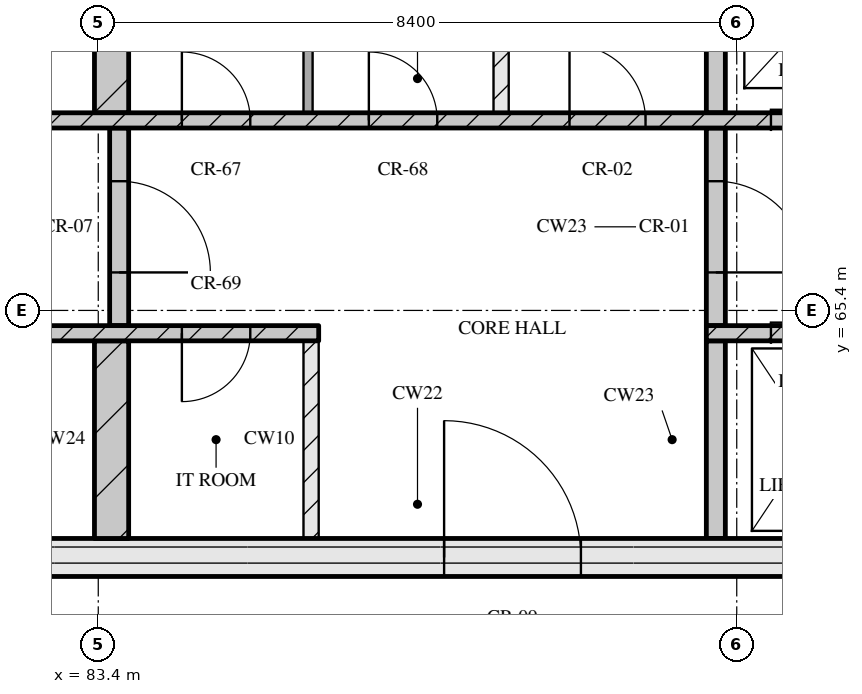
"""IFC4 building model, lengths in metres.
Left out: names, types, materials, properties, quantities, classifications, styles, units other than length and angle.
Written with IfcOpenShell. Run it as: python <this file> out.ifc"""

import sys

from ifc_helpers import new_model, si_unit, direction, frame, frame_2d, origin, place, context, subcontext, project, spatial, rectangle, extrude, element, fill, save


model = new_model("IFC4")
c1 = context("Model", 3, precision=1e-05, world=origin(), true_north=direction((0.0, 1.0)))
c2 = subcontext(c1, "Body", "Model", "MODEL_VIEW")
j1 = project(units=[si_unit("LENGTHUNIT", "METRE"), si_unit("PLANEANGLEUNIT", "RADIAN")], contexts=[c1])
p1 = place(None, origin())
s1 = spatial("IfcSite", under=j1, at=p1, CompositionType="ELEMENT")
p2 = place(p1, origin())
s2 = spatial("IfcBuilding", under=s1, at=p2, CompositionType="ELEMENT")
p3 = place(p2, frame((0.0, 0.0, 267.15)))
s3 = spatial("IfcBuildingStorey", under=s2, at=p3, CompositionType="ELEMENT", Elevation=267.15)
p4 = place(p3, frame((67.3, 62.15, 0.0), z_axis=(0.0, 0.0, 1.0), x_axis=(1.0, 0.0, 0.0)))
e1 = element("IfcWall", 1, at=p4, inside=s3, PredefinedType="SOLIDWALL", context=c2, shape_type="SweptSolid", body=[
    extrude(rectangle(XDim=40.6, YDim=0.5, at=frame_2d((20.3, 0.0))), origin(), (0.0, 0.0, 1.0), 3.32),
])
p5 = place(p4, frame((20.65, 0.0, 0.0)))
e2 = element("IfcOpeningElement", 2, at=p5, cuts=e1, PredefinedType="OPENING", context=c2, shape_type="SweptSolid", body=[
    extrude(rectangle(XDim=1.8, YDim=2.1, at=frame_2d((0.9, 1.05))), frame((0.0, 0.26, 0.0), z_axis=(0.0, -1.0, 0.0), x_axis=(1.0, 0.0, 0.0)), (0.0, 0.0, 1.0), 0.52),
])
p6 = place(p3, frame((83.575, 62.4, 0.0), z_axis=(0.0, 0.0, 1.0), x_axis=(0.0, 1.0, 0.0)))
e3 = element("IfcWall", 3, at=p6, inside=s3, PredefinedType="SOLIDWALL", context=c2, shape_type="SweptSolid", body=[
    extrude(rectangle(XDim=2.6, YDim=0.45, at=frame_2d((1.3, 0.0))), origin(), (0.0, 0.0, 1.0), 3.32),
])
p7 = place(p3, frame((86.2, 62.4, 0.0), z_axis=(0.0, 0.0, 1.0), x_axis=(0.0, 1.0, 0.0)))
e4 = element("IfcWall", 4, at=p7, inside=s3, PredefinedType="PARTITIONING", context=c2, shape_type="SweptSolid", body=[
    extrude(rectangle(XDim=2.6, YDim=0.2, at=frame_2d((1.3, 0.0))), origin(), (0.0, 0.0, 1.0), 3.32),
])
p8 = place(p3, frame((91.525, 62.4, 0.0), z_axis=(0.0, 0.0, 1.0), x_axis=(0.0, 1.0, 0.0)))
e5 = element("IfcWall", 5, at=p8, inside=s3, PredefinedType="SOLIDWALL", context=c2, shape_type="SweptSolid", body=[
    extrude(rectangle(XDim=2.6, YDim=0.25, at=frame_2d((1.3, 0.0))), origin(), (0.0, 0.0, 1.0), 3.32),
])
p9 = place(p3, frame((67.8, 65.1, 0.0), z_axis=(0.0, 0.0, 1.0), x_axis=(1.0, 0.0, 0.0)))
e6 = element("IfcWall", 6, at=p9, inside=s3, PredefinedType="SOLIDWALL", context=c2, shape_type="SweptSolid", body=[
    extrude(rectangle(XDim=18.5, YDim=0.2, at=frame_2d((9.25, 0.0))), origin(), (0.0, 0.0, 1.0), 3.32),
])
p10 = place(p9, frame((7.27, 0.0, 0.0)))
e7 = element("IfcOpeningElement", 7, at=p10, cuts=e6, PredefinedType="OPENING", context=c2, shape_type="SweptSolid", body=[
    extrude(rectangle(XDim=0.9, YDim=2.1, at=frame_2d((0.45, 1.05))), frame((0.0, 0.11, 0.0), z_axis=(0.0, -1.0, 0.0), x_axis=(1.0, 0.0, 0.0)), (0.0, 0.0, 1.0), 0.22),
])
p11 = place(p9, frame((11.45, 0.0, 0.0)))
e8 = element("IfcOpeningElement", 8, at=p11, cuts=e6, PredefinedType="OPENING", context=c2, shape_type="SweptSolid", body=[
    extrude(rectangle(XDim=0.9, YDim=2.1, at=frame_2d((0.45, 1.05))), frame((0.0, 0.11, 0.0), z_axis=(0.0, -1.0, 0.0), x_axis=(1.0, 0.0, 0.0)), (0.0, 0.0, 1.0), 0.22),
])
p12 = place(p9, frame((16.7, 0.0, 0.0)))
e9 = element("IfcOpeningElement", 9, at=p12, cuts=e6, PredefinedType="OPENING", context=c2, shape_type="SweptSolid", body=[
    extrude(rectangle(XDim=0.9, YDim=2.1, at=frame_2d((0.45, 1.05))), frame((0.0, 0.11, 0.0), z_axis=(0.0, -1.0, 0.0), x_axis=(1.0, 0.0, 0.0)), (0.0, 0.0, 1.0), 0.22),
])
p13 = place(p3, frame((91.4, 65.1, 0.0), z_axis=(0.0, 0.0, 1.0), x_axis=(1.0, 0.0, 0.0)))
e10 = element("IfcWall", 10, at=p13, inside=s3, PredefinedType="SOLIDWALL", context=c2, shape_type="SweptSolid", body=[
    extrude(rectangle(XDim=16.0, YDim=0.2, at=frame_2d((8.0, 0.0))), origin(), (0.0, 0.0, 1.0), 3.32),
])
p14 = place(p13, frame((0.85, 0.0, 0.0)))
e11 = element("IfcOpeningElement", 11, at=p14, cuts=e10, PredefinedType="OPENING", context=c2, shape_type="SweptSolid", body=[
    extrude(rectangle(XDim=1.1, YDim=2.1, at=frame_2d((0.55, 1.05))), frame((0.0, 0.11, 0.0), z_axis=(0.0, -1.0, 0.0), x_axis=(1.0, 0.0, 0.0)), (0.0, 0.0, 1.0), 0.22),
])
p15 = place(p13, frame((3.35, 0.0, 0.0)))
e12 = element("IfcOpeningElement", 12, at=p15, cuts=e10, PredefinedType="OPENING", context=c2, shape_type="SweptSolid", body=[
    extrude(rectangle(XDim=1.1, YDim=2.1, at=frame_2d((0.55, 1.05))), frame((0.0, 0.11, 0.0), z_axis=(0.0, -1.0, 0.0), x_axis=(1.0, 0.0, 0.0)), (0.0, 0.0, 1.0), 0.22),
])
p16 = place(p13, frame((5.85, 0.0, 0.0)))
e13 = element("IfcOpeningElement", 13, at=p16, cuts=e10, PredefinedType="OPENING", context=c2, shape_type="SweptSolid", body=[
    extrude(rectangle(XDim=1.1, YDim=2.1, at=frame_2d((0.55, 1.05))), frame((0.0, 0.11, 0.0), z_axis=(0.0, -1.0, 0.0), x_axis=(1.0, 0.0, 0.0)), (0.0, 0.0, 1.0), 0.22),
])
p17 = place(p13, frame((7.83, 0.0, 0.0)))
e14 = element("IfcOpeningElement", 14, at=p17, cuts=e10, PredefinedType="OPENING", context=c2, shape_type="SweptSolid", body=[
    extrude(rectangle(XDim=0.9, YDim=2.1, at=frame_2d((0.45, 1.05))), frame((0.0, 0.11, 0.0), z_axis=(0.0, -1.0, 0.0), x_axis=(1.0, 0.0, 0.0)), (0.0, 0.0, 1.0), 0.22),
])
p18 = place(p3, frame((83.675, 65.2, 0.0), z_axis=(0.0, 0.0, 1.0), x_axis=(0.0, 1.0, 0.0)))
e15 = element("IfcWall", 15, at=p18, inside=s3, PredefinedType="SOLIDWALL", context=c2, shape_type="SweptSolid", body=[
    extrude(rectangle(XDim=2.6, YDim=0.25, at=frame_2d((1.3, 0.0))), origin(), (0.0, 0.0, 1.0), 3.32),
])
p19 = place(p18, frame((0.7, 0.0, 0.0)))
e16 = element("IfcOpeningElement", 16, at=p19, cuts=e15, PredefinedType="OPENING", context=c2, shape_type="SweptSolid", body=[
    extrude(rectangle(XDim=1.2, YDim=2.1, at=frame_2d((0.6, 1.05))), frame((0.0, 0.135, 0.0), z_axis=(0.0, -1.0, 0.0), x_axis=(1.0, 0.0, 0.0)), (0.0, 0.0, 1.0), 0.27),
])
p20 = place(p3, frame((91.525, 65.2, 0.0), z_axis=(0.0, 0.0, 1.0), x_axis=(0.0, 1.0, 0.0)))
e17 = element("IfcWall", 17, at=p20, inside=s3, PredefinedType="SOLIDWALL", context=c2, shape_type="SweptSolid", body=[
    extrude(rectangle(XDim=2.6, YDim=0.25, at=frame_2d((1.3, 0.0))), origin(), (0.0, 0.0, 1.0), 3.32),
])
p21 = place(p20, frame((0.7, 0.0, 0.0)))
e18 = element("IfcOpeningElement", 18, at=p21, cuts=e17, PredefinedType="OPENING", context=c2, shape_type="SweptSolid", body=[
    extrude(rectangle(XDim=1.2, YDim=2.1, at=frame_2d((0.6, 1.05))), frame((0.0, 0.135, 0.0), z_axis=(0.0, -1.0, 0.0), x_axis=(1.0, 0.0, 0.0)), (0.0, 0.0, 1.0), 0.27),
])
p22 = place(p3, frame((76.05, 67.9, 0.0), z_axis=(0.0, 0.0, 1.0), x_axis=(1.0, 0.0, 0.0)))
e19 = element("IfcWall", 19, at=p22, inside=s3, PredefinedType="SOLIDWALL", context=c2, shape_type="SweptSolid", body=[
    extrude(rectangle(XDim=23.1, YDim=0.2, at=frame_2d((11.55, 0.0))), origin(), (0.0, 0.0, 1.0), 3.32),
])
p23 = place(p22, frame((1.4, 0.0, 0.0)))
e20 = element("IfcOpeningElement", 20, at=p23, cuts=e19, PredefinedType="OPENING", context=c2, shape_type="SweptSolid", body=[
    extrude(rectangle(XDim=0.9, YDim=2.1, at=frame_2d((0.45, 1.05))), frame((0.0, 0.11, 0.0), z_axis=(0.0, -1.0, 0.0), x_axis=(1.0, 0.0, 0.0)), (0.0, 0.0, 1.0), 0.22),
])
p24 = place(p22, frame((5.11, 0.0, 0.0)))
e21 = element("IfcOpeningElement", 21, at=p24, cuts=e19, PredefinedType="OPENING", context=c2, shape_type="SweptSolid", body=[
    extrude(rectangle(XDim=0.9, YDim=2.1, at=frame_2d((0.45, 1.05))), frame((0.0, 0.11, 0.0), z_axis=(0.0, -1.0, 0.0), x_axis=(1.0, 0.0, 0.0)), (0.0, 0.0, 1.0), 0.22),
])
p25 = place(p22, frame((8.45, 0.0, 0.0)))
e22 = element("IfcOpeningElement", 22, at=p25, cuts=e19, PredefinedType="OPENING", context=c2, shape_type="SweptSolid", body=[
    extrude(rectangle(XDim=0.9, YDim=2.1, at=frame_2d((0.45, 1.05))), frame((0.0, 0.11, 0.0), z_axis=(0.0, -1.0, 0.0), x_axis=(1.0, 0.0, 0.0)), (0.0, 0.0, 1.0), 0.22),
])
p26 = place(p22, frame((10.91, 0.0, 0.0)))
e23 = element("IfcOpeningElement", 23, at=p26, cuts=e19, PredefinedType="OPENING", context=c2, shape_type="SweptSolid", body=[
    extrude(rectangle(XDim=0.9, YDim=2.1, at=frame_2d((0.45, 1.05))), frame((0.0, 0.11, 0.0), z_axis=(0.0, -1.0, 0.0), x_axis=(1.0, 0.0, 0.0)), (0.0, 0.0, 1.0), 0.22),
])
p27 = place(p22, frame((13.55, 0.0, 0.0)))
e24 = element("IfcOpeningElement", 24, at=p27, cuts=e19, PredefinedType="OPENING", context=c2, shape_type="SweptSolid", body=[
    extrude(rectangle(XDim=1.0, YDim=2.1, at=frame_2d((0.5, 1.05))), frame((0.0, 0.11, 0.0), z_axis=(0.0, -1.0, 0.0), x_axis=(1.0, 0.0, 0.0)), (0.0, 0.0, 1.0), 0.22),
])
p28 = place(p22, frame((16.2, 0.0, 0.0)))
e25 = element("IfcOpeningElement", 25, at=p28, cuts=e19, PredefinedType="OPENING", context=c2, shape_type="SweptSolid", body=[
    extrude(rectangle(XDim=1.1, YDim=2.1, at=frame_2d((0.55, 1.05))), frame((0.0, 0.11, 0.0), z_axis=(0.0, -1.0, 0.0), x_axis=(1.0, 0.0, 0.0)), (0.0, 0.0, 1.0), 0.22),
])
p29 = place(p22, frame((18.7, 0.0, 0.0)))
e26 = element("IfcOpeningElement", 26, at=p29, cuts=e19, PredefinedType="OPENING", context=c2, shape_type="SweptSolid", body=[
    extrude(rectangle(XDim=1.1, YDim=2.1, at=frame_2d((0.55, 1.05))), frame((0.0, 0.11, 0.0), z_axis=(0.0, -1.0, 0.0), x_axis=(1.0, 0.0, 0.0)), (0.0, 0.0, 1.0), 0.22),
])
p30 = place(p22, frame((21.2, 0.0, 0.0)))
e27 = element("IfcOpeningElement", 27, at=p30, cuts=e19, PredefinedType="OPENING", context=c2, shape_type="SweptSolid", body=[
    extrude(rectangle(XDim=1.1, YDim=2.1, at=frame_2d((0.55, 1.05))), frame((0.0, 0.11, 0.0), z_axis=(0.0, -1.0, 0.0), x_axis=(1.0, 0.0, 0.0)), (0.0, 0.0, 1.0), 0.22),
])
p31 = place(p3, frame((83.575, 68.0, 0.0), z_axis=(0.0, 0.0, 1.0), x_axis=(0.0, 1.0, 0.0)))
e28 = element("IfcWall", 28, at=p31, inside=s3, PredefinedType="SOLIDWALL", context=c2, shape_type="SweptSolid", body=[
    extrude(rectangle(XDim=2.6, YDim=0.45, at=frame_2d((1.3, 0.0))), origin(), (0.0, 0.0, 1.0), 3.32),
])
p32 = place(p3, frame((86.16, 68.0, 0.0), z_axis=(0.0, 0.0, 1.0), x_axis=(0.0, 1.0, 0.0)))
e29 = element("IfcWall", 29, at=p32, inside=s3, PredefinedType="PARTITIONING", context=c2, shape_type="SweptSolid", body=[
    extrude(rectangle(XDim=2.6, YDim=0.12, at=frame_2d((1.3, 0.0))), origin(), (0.0, 0.0, 1.0), 3.32),
])
p33 = place(p3, frame((88.7, 68.0, 0.0), z_axis=(0.0, 0.0, 1.0), x_axis=(0.0, 1.0, 0.0)))
e30 = element("IfcWall", 30, at=p33, inside=s3, PredefinedType="PARTITIONING", context=c2, shape_type="SweptSolid", body=[
    extrude(rectangle(XDim=2.6, YDim=0.2, at=frame_2d((1.3, 0.0))), origin(), (0.0, 0.0, 1.0), 3.32),
])
p34 = place(p3, frame((91.525, 68.0, 0.0), z_axis=(0.0, 0.0, 1.0), x_axis=(0.0, 1.0, 0.0)))
e31 = element("IfcWall", 31, at=p34, inside=s3, PredefinedType="SOLIDWALL", context=c2, shape_type="SweptSolid", body=[
    extrude(rectangle(XDim=2.6, YDim=0.25, at=frame_2d((1.3, 0.0))), origin(), (0.0, 0.0, 1.0), 3.32),
])
p35 = place(p5, origin())
e32 = element("IfcDoor", 32, at=p35, inside=s3, OperationType="DOUBLE_DOOR_SINGLE_SWING", PredefinedType="DOOR", context=c2, shape_type="SweptSolid", body=[
    extrude(rectangle(XDim=1.8, YDim=2.1, at=frame_2d((0.9, 1.05))), frame((0.0, 0.025, 0.0), z_axis=(0.0, -1.0, 0.0), x_axis=(1.0, 0.0, 0.0)), (0.0, 0.0, 1.0), 0.05),
])
fill(e2, e32)
p36 = place(p12, origin())
e33 = element("IfcDoor", 33, at=p36, inside=s3, OperationType="SINGLE_SWING_RIGHT", PredefinedType="DOOR", context=c2, shape_type="SweptSolid", body=[
    extrude(rectangle(XDim=0.9, YDim=2.1, at=frame_2d((0.45, 1.05))), frame((0.0, 0.025, 0.0), z_axis=(0.0, -1.0, 0.0), x_axis=(1.0, 0.0, 0.0)), (0.0, 0.0, 1.0), 0.05),
])
fill(e9, e33)
p37 = place(p14, origin())
e34 = element("IfcDoor", 34, at=p37, inside=s3, OperationType="SLIDING_TO_LEFT", PredefinedType="DOOR", context=c2, shape_type="SweptSolid", body=[
    extrude(rectangle(XDim=1.1, YDim=2.1, at=frame_2d((0.55, 1.05))), frame((0.0, 0.025, 0.0), z_axis=(0.0, -1.0, 0.0), x_axis=(1.0, 0.0, 0.0)), (0.0, 0.0, 1.0), 0.05),
])
fill(e11, e34)
p38 = place(p19, origin())
e35 = element("IfcDoor", 35, at=p38, inside=s3, OperationType="SINGLE_SWING_RIGHT", PredefinedType="DOOR", context=c2, shape_type="SweptSolid", body=[
    extrude(rectangle(XDim=1.2, YDim=2.1, at=frame_2d((0.6, 1.05))), frame((0.0, 0.025, 0.0), z_axis=(0.0, -1.0, 0.0), x_axis=(1.0, 0.0, 0.0)), (0.0, 0.0, 1.0), 0.05),
])
fill(e16, e35)
p39 = place(p21, origin())
e36 = element("IfcDoor", 36, at=p39, inside=s3, OperationType="SINGLE_SWING_RIGHT", PredefinedType="DOOR", context=c2, shape_type="SweptSolid", body=[
    extrude(rectangle(XDim=1.2, YDim=2.1, at=frame_2d((0.6, 1.05))), frame((0.0, 0.025, 0.0), z_axis=(0.0, -1.0, 0.0), x_axis=(1.0, 0.0, 0.0)), (0.0, 0.0, 1.0), 0.05),
])
fill(e18, e36)
p40 = place(p25, origin())
e37 = element("IfcDoor", 37, at=p40, inside=s3, OperationType="SINGLE_SWING_LEFT", PredefinedType="DOOR", context=c2, shape_type="SweptSolid", body=[
    extrude(rectangle(XDim=0.9, YDim=2.1, at=frame_2d((0.45, 1.05))), frame((0.0, 0.025, 0.0), z_axis=(0.0, -1.0, 0.0), x_axis=(1.0, 0.0, 0.0)), (0.0, 0.0, 1.0), 0.05),
])
fill(e22, e37)
p41 = place(p26, origin())
e38 = element("IfcDoor", 38, at=p41, inside=s3, OperationType="SINGLE_SWING_LEFT", PredefinedType="DOOR", context=c2, shape_type="SweptSolid", body=[
    extrude(rectangle(XDim=0.9, YDim=2.1, at=frame_2d((0.45, 1.05))), frame((0.0, 0.025, 0.0), z_axis=(0.0, -1.0, 0.0), x_axis=(1.0, 0.0, 0.0)), (0.0, 0.0, 1.0), 0.05),
])
fill(e23, e38)
p42 = place(p27, origin())
e39 = element("IfcDoor", 39, at=p42, inside=s3, OperationType="SINGLE_SWING_LEFT", PredefinedType="DOOR", context=c2, shape_type="SweptSolid", body=[
    extrude(rectangle(XDim=1.0, YDim=2.1, at=frame_2d((0.5, 1.05))), frame((0.0, 0.025, 0.0), z_axis=(0.0, -1.0, 0.0), x_axis=(1.0, 0.0, 0.0)), (0.0, 0.0, 1.0), 0.05),
])
fill(e24, e39)
p43 = place(p28, origin())
e40 = element("IfcDoor", 40, at=p43, inside=s3, OperationType="SLIDING_TO_RIGHT", PredefinedType="DOOR", context=c2, shape_type="SweptSolid", body=[
    extrude(rectangle(XDim=1.1, YDim=2.1, at=frame_2d((0.55, 1.05))), frame((0.0, 0.025, 0.0), z_axis=(0.0, -1.0, 0.0), x_axis=(1.0, 0.0, 0.0)), (0.0, 0.0, 1.0), 0.05),
])
fill(e25, e40)
save(model, sys.argv[1])
